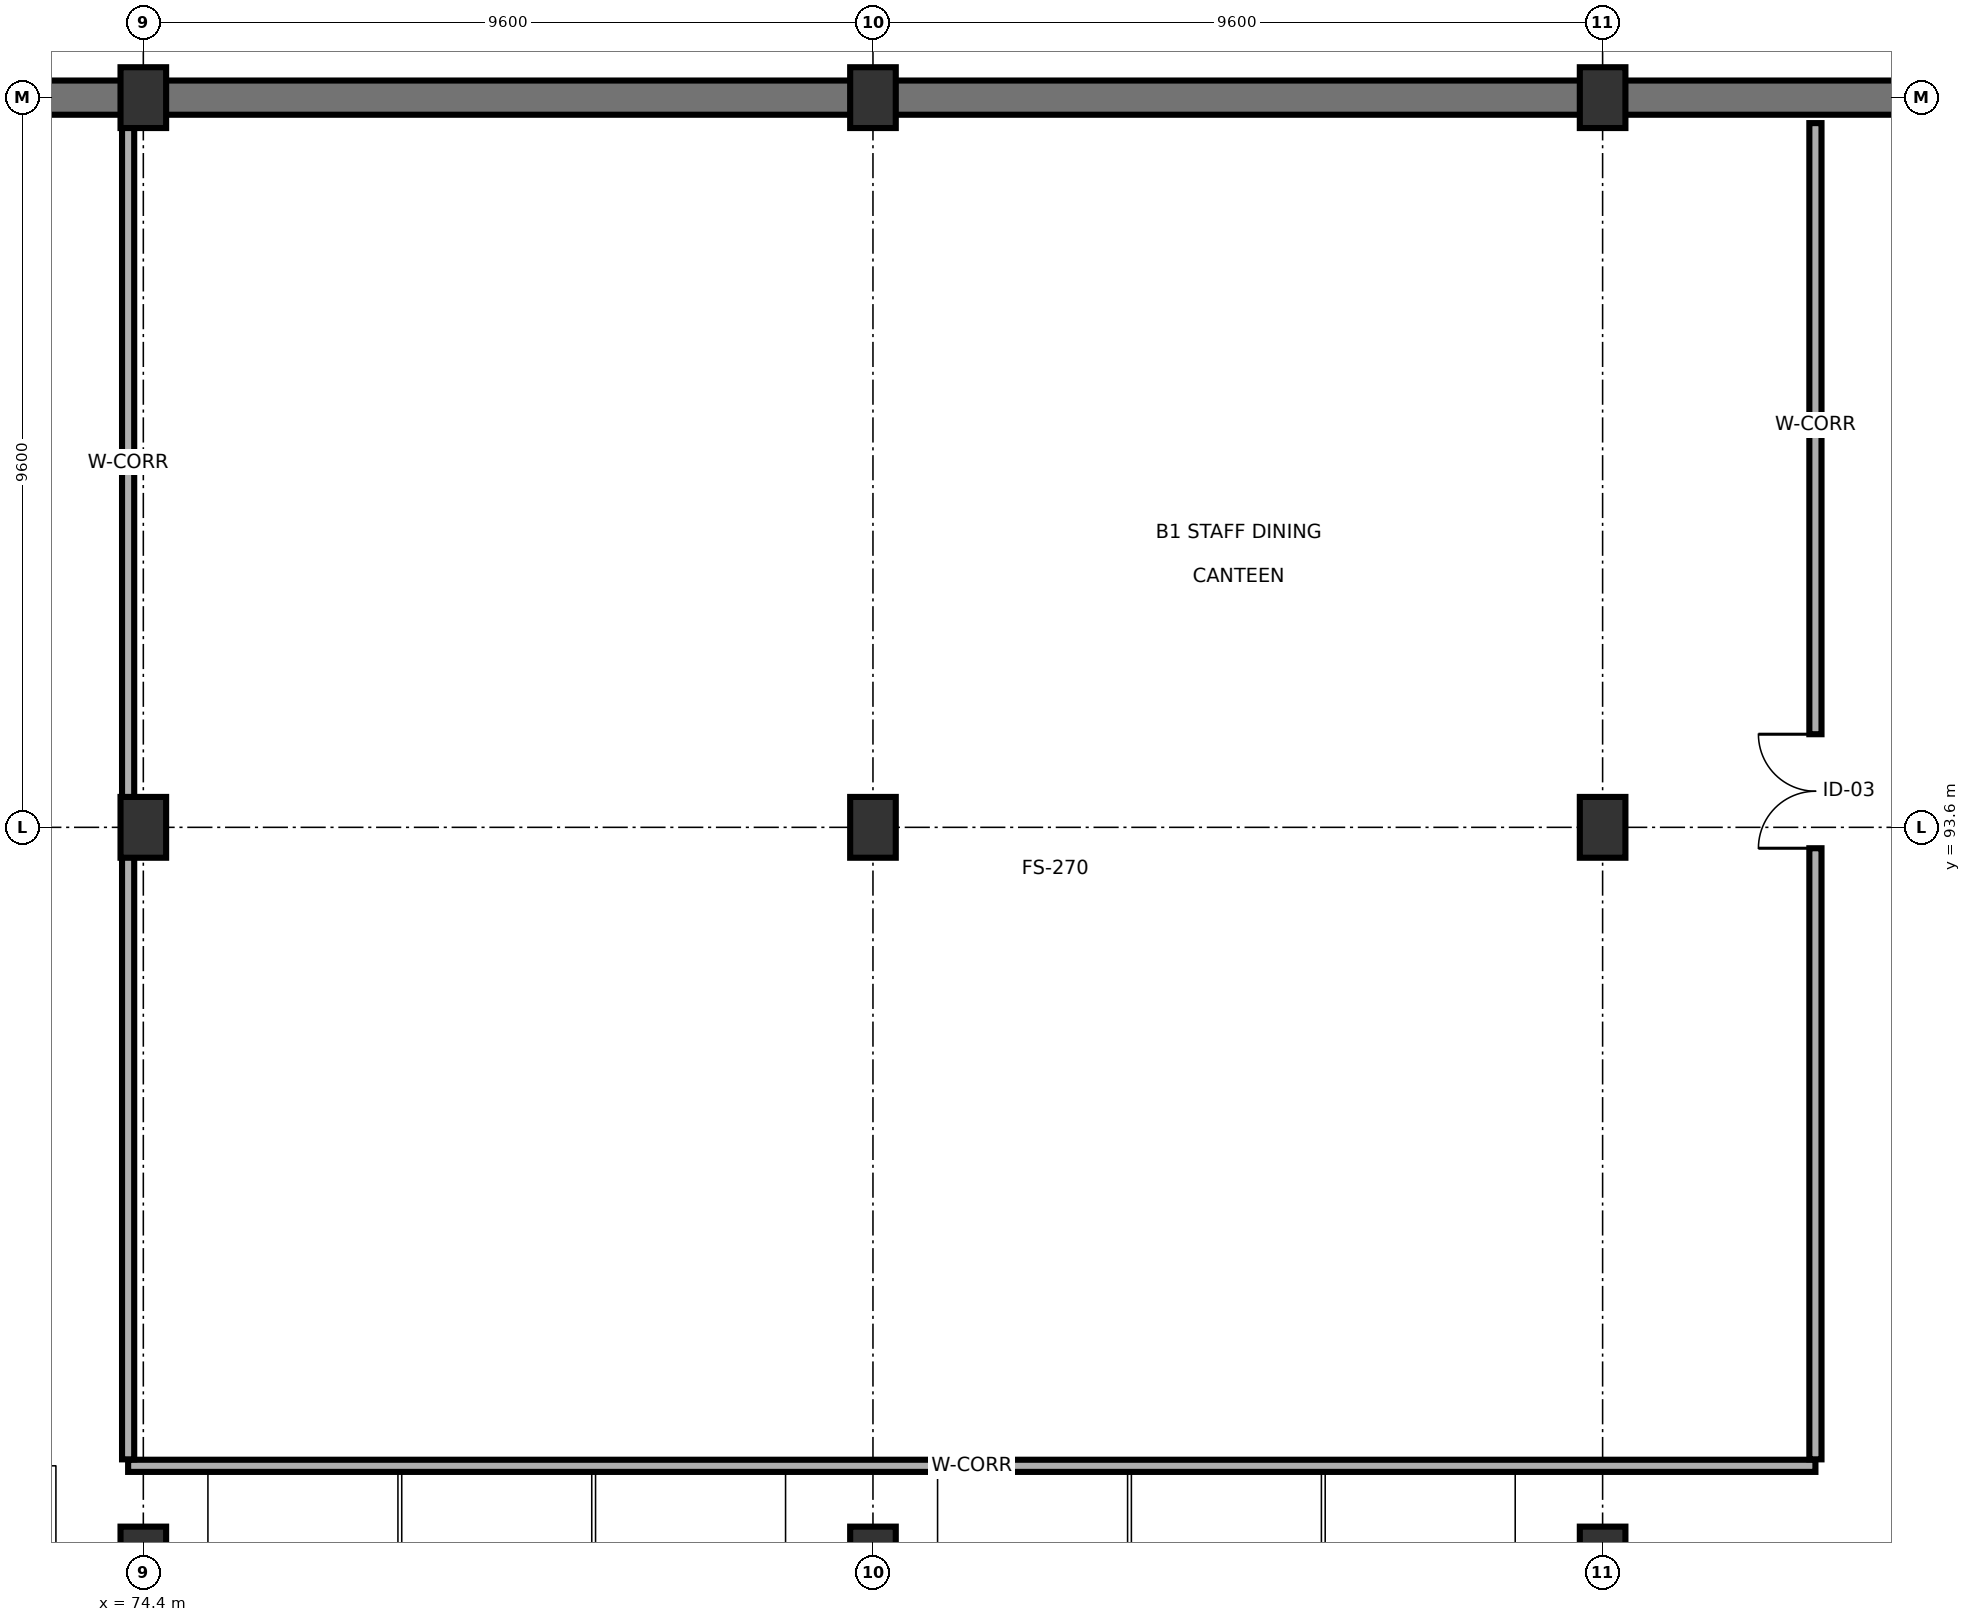
"""IFC4 building model, lengths in metres.
Left out: names, types, materials, properties, quantities, classifications, styles, units other than length and angle.
Written with IfcOpenShell. Run it as: python <this file> out.ifc"""

import sys

from ifc_helpers import new_model, si_unit, direction, frame, frame_2d, origin, origin_2d, place, context, subcontext, project, spatial, rectangle, extrude, element, fill, save


model = new_model("IFC4")
c1 = context("Model", 3, precision=1e-05, world=origin(), true_north=direction((0.0, 1.0)))
c2 = subcontext(c1, "Body", "Model", "MODEL_VIEW")
j1 = project(units=[si_unit("LENGTHUNIT", "METRE"), si_unit("PLANEANGLEUNIT", "RADIAN")], contexts=[c1])
p1 = place(None, origin())
s1 = spatial("IfcSite", under=j1, at=p1, CompositionType="ELEMENT")
p2 = place(p1, origin())
s2 = spatial("IfcBuilding", under=s1, at=p2, CompositionType="ELEMENT")
p3 = place(p2, frame((0.0, 0.0, -4.2)))
s3 = spatial("IfcBuildingStorey", under=s2, at=p3, CompositionType="ELEMENT", Elevation=-4.2)
for number, where, z_axis, x_axis in (
    (1, (74.4, 84.0, 0.0), (0.0, 0.0, 1.0), (1.0, 0.0, 0.0)),
    (2, (74.4, 93.6, 0.0), (0.0, 0.0, 1.0), (1.0, 0.0, 0.0)),
    (3, (74.4, 103.2, 0.0), (0.0, 0.0, 1.0), (1.0, 0.0, 0.0)),
    (4, (84.0, 84.0, 0.0), (0.0, 0.0, 1.0), (1.0, 0.0, 0.0)),
    (5, (84.0, 93.6, 0.0), (0.0, 0.0, 1.0), (1.0, 0.0, 0.0)),
    (6, (84.0, 103.2, 0.0), (0.0, 0.0, 1.0), (1.0, 0.0, 0.0)),
    (7, (93.6, 84.0, 0.0), (0.0, 0.0, 1.0), (1.0, 0.0, 0.0)),
    (8, (93.6, 93.6, 0.0), (0.0, 0.0, 1.0), (1.0, 0.0, 0.0)),
    (9, (93.6, 103.2, 0.0), (0.0, 0.0, 1.0), (1.0, 0.0, 0.0)),
):
    element("IfcColumn", number, at=place(p3, frame(where, z_axis=z_axis, x_axis=x_axis)), inside=s3, PredefinedType="COLUMN", context=c2, shape_type="SweptSolid", body=[
        extrude(rectangle(XDim=0.6, YDim=0.8, at=origin_2d()), origin(), (0.0, 0.0, 1.0), 4.2),
    ])
p4 = place(p3, frame((117.1, 103.2, 0.0), z_axis=(0.0, 0.0, 1.0), x_axis=(-1.0, 0.0, 0.0)))
e10 = element("IfcWall", 10, at=p4, inside=s3, PredefinedType="SOLIDWALL", context=c2, shape_type="SweptSolid", body=[
    extrude(rectangle(XDim=80.6, YDim=0.45, at=frame_2d((40.3, 0.0))), origin(), (0.0, 0.0, 1.0), 3.88),
])
p5 = place(p3, frame((74.2, 85.2, 0.0), z_axis=(0.0, 0.0, 1.0), x_axis=(1.0, 0.0, 0.0)))
e11 = element("IfcWall", 11, at=p5, inside=s3, PredefinedType="PARTITIONING", context=c2, shape_type="SweptSolid", body=[
    extrude(rectangle(XDim=22.2, YDim=0.16, at=frame_2d((11.1, 0.0))), origin(), (0.0, 0.0, 1.0), 3.315),
])
p6 = place(p3, frame((74.2, 85.285, 0.0), z_axis=(0.0, 0.0, 1.0), x_axis=(0.0, 1.0, 0.0)))
e12 = element("IfcWall", 12, at=p6, inside=s3, PredefinedType="PARTITIONING", context=c2, shape_type="SweptSolid", body=[
    extrude(rectangle(XDim=17.58, YDim=0.16, at=frame_2d((8.79, 0.0))), origin(), (0.0, 0.0, 1.0), 3.325),
])
p7 = place(p3, frame((96.4, 85.285, 0.0), z_axis=(0.0, 0.0, 1.0), x_axis=(0.0, 1.0, 0.0)))
e13 = element("IfcWall", 13, at=p7, inside=s3, PredefinedType="PARTITIONING", context=c2, shape_type="SweptSolid", body=[
    extrude(rectangle(XDim=17.58, YDim=0.16, at=frame_2d((8.79, 0.0))), origin(), (0.0, 0.0, 1.0), 3.325),
])
p8 = place(p7, frame((8.04, 0.0, 0.0)))
e14 = element("IfcOpeningElement", 14, at=p8, cuts=e13, PredefinedType="OPENING", context=c2, shape_type="SweptSolid", body=[
    extrude(rectangle(XDim=1.5, YDim=2.25, at=frame_2d((0.75, 1.125))), frame((0.0, 0.09, 0.0), z_axis=(0.0, -1.0, 0.0), x_axis=(1.0, 0.0, 0.0)), (0.0, 0.0, 1.0), 0.18),
])
p9 = place(p8, origin())
e15 = element("IfcDoor", 15, at=p9, inside=s3, OperationType="DOUBLE_DOOR_SINGLE_SWING", PredefinedType="DOOR", context=c2, shape_type="SweptSolid", body=[
    extrude(rectangle(XDim=1.5, YDim=2.25, at=frame_2d((0.75, 1.125))), frame((0.0, 0.025, 0.0), z_axis=(0.0, -1.0, 0.0), x_axis=(1.0, 0.0, 0.0)), (0.0, 0.0, 1.0), 0.05),
])
fill(e14, e15)
save(model, sys.argv[1])
